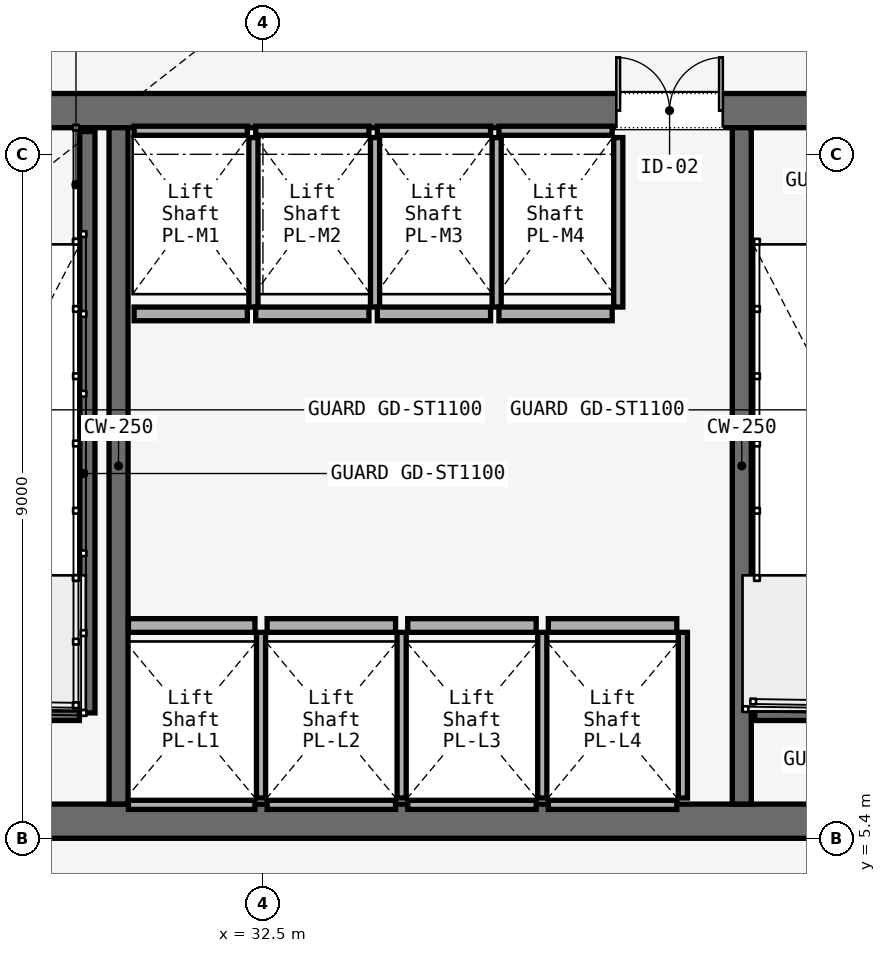
"""IFC4 building model, lengths in metres.
Left out: names, types, materials, properties, quantities, classifications, styles, units other than length and angle.
Written with IfcOpenShell. Run it as: python <this file> out.ifc"""

import sys

from ifc_helpers import new_model, si_unit, direction, frame, frame_2d, origin, place, context, subcontext, project, spatial, rectangle, extrude, element, fill, save


model = new_model("IFC4")
c1 = context("Model", 3, precision=1e-05, world=origin(), true_north=direction((0.0, 1.0)))
c2 = subcontext(c1, "Body", "Model", "MODEL_VIEW")
j1 = project(units=[si_unit("LENGTHUNIT", "METRE"), si_unit("PLANEANGLEUNIT", "RADIAN")], contexts=[c1])
p1 = place(None, origin())
s1 = spatial("IfcSite", under=j1, at=p1, CompositionType="ELEMENT")
p2 = place(p1, origin())
s2 = spatial("IfcBuilding", under=s1, at=p2, CompositionType="ELEMENT")
p3 = place(p2, frame((0.0, 0.0, 30.0)))
s3 = spatial("IfcBuildingStorey", under=s2, at=p3, CompositionType="ELEMENT", Elevation=30.0)
p4 = place(p3, frame((26.45, 14.975, 0.0), z_axis=(0.0, 0.0, 1.0), x_axis=(1.0, 0.0, 0.0)))
e1 = element("IfcWall", 1, at=p4, inside=s3, PredefinedType="SOLIDWALL", context=c2, shape_type="SweptSolid", body=[
    extrude(rectangle(XDim=31.1, YDim=0.45, at=frame_2d((15.55, 0.0))), origin(), (0.0, 0.0, 1.0), 5.78),
])
p5 = place(p4, frame((1.65, 0.0, 0.0)))
e2 = element("IfcOpeningElement", 2, at=p5, cuts=e1, PredefinedType="OPENING", context=c2, shape_type="SweptSolid", body=[
    extrude(rectangle(XDim=1.1, YDim=2.2, at=frame_2d((0.55, 1.1))), frame((0.0, 0.225, 0.0), z_axis=(0.0, -1.0, 0.0), x_axis=(1.0, 0.0, 0.0)), (0.0, 0.0, 1.0), 0.45),
])
p6 = place(p4, frame((13.65, 0.0, 0.0)))
e3 = element("IfcOpeningElement", 3, at=p6, cuts=e1, PredefinedType="OPENING", context=c2, shape_type="SweptSolid", body=[
    extrude(rectangle(XDim=1.1, YDim=2.2, at=frame_2d((0.55, 1.1))), frame((0.0, 0.225, 0.0), z_axis=(0.0, -1.0, 0.0), x_axis=(1.0, 0.0, 0.0)), (0.0, 0.0, 1.0), 0.45),
])
p7 = place(p4, frame((25.55, 0.0, 0.0)))
e4 = element("IfcOpeningElement", 4, at=p7, cuts=e1, PredefinedType="OPENING", context=c2, shape_type="SweptSolid", body=[
    extrude(rectangle(XDim=1.1, YDim=2.2, at=frame_2d((0.55, 1.1))), frame((0.0, 0.225, 0.0), z_axis=(0.0, -1.0, 0.0), x_axis=(1.0, 0.0, 0.0)), (0.0, 0.0, 1.0), 0.45),
])
p8 = place(p4, frame((10.7, 0.0, 0.0)))
e5 = element("IfcOpeningElement", 5, at=p8, cuts=e1, PredefinedType="OPENING", context=c2, shape_type="SweptSolid", body=[
    extrude(rectangle(XDim=1.4, YDim=2.2, at=frame_2d((0.7, 1.1))), frame((0.0, 0.225, 0.0), z_axis=(0.0, -1.0, 0.0), x_axis=(1.0, 0.0, 0.0)), (0.0, 0.0, 1.0), 0.45),
])
p9 = place(p4, frame((19.35, 0.0, 0.0)))
e6 = element("IfcOpeningElement", 6, at=p9, cuts=e1, PredefinedType="OPENING", context=c2, shape_type="SweptSolid", body=[
    extrude(rectangle(XDim=1.1, YDim=2.2, at=frame_2d((0.55, 1.1))), frame((0.0, 0.225, 0.0), z_axis=(0.0, -1.0, 0.0), x_axis=(1.0, 0.0, 0.0)), (0.0, 0.0, 1.0), 0.45),
])
p10 = place(p4, frame((21.4, 0.0, 0.0)))
e7 = element("IfcOpeningElement", 7, at=p10, cuts=e1, PredefinedType="OPENING", context=c2, shape_type="SweptSolid", body=[
    extrude(rectangle(XDim=0.9, YDim=2.1, at=frame_2d((0.45, 1.05))), frame((0.0, 0.225, 0.0), z_axis=(0.0, -1.0, 0.0), x_axis=(1.0, 0.0, 0.0)), (0.0, 0.0, 1.0), 0.45),
])
p11 = place(p4, frame((23.35, 0.0, 0.0)))
e8 = element("IfcOpeningElement", 8, at=p11, cuts=e1, PredefinedType="OPENING", context=c2, shape_type="SweptSolid", body=[
    extrude(rectangle(XDim=1.3, YDim=2.3, at=frame_2d((0.65, 1.15))), frame((0.0, 0.225, 0.0), z_axis=(0.0, -1.0, 0.0), x_axis=(1.0, 0.0, 0.0)), (0.0, 0.0, 1.0), 0.45),
])
p12 = place(p3, frame((26.45, 5.625, 0.0), z_axis=(0.0, 0.0, 1.0), x_axis=(1.0, 0.0, 0.0)))
e9 = element("IfcWall", 9, at=p12, inside=s3, PredefinedType="SOLIDWALL", context=c2, shape_type="SweptSolid", body=[
    extrude(rectangle(XDim=31.1, YDim=0.45, at=frame_2d((15.55, 0.0))), origin(), (0.0, 0.0, 1.0), 5.78),
])
for number, where, z_axis, x_axis in (
    (10, (30.6, 5.85, 0.0), (0.0, 0.0, 1.0), (0.0, 1.0, 0.0)),
    (11, (38.8, 5.85, 0.0), (0.0, 0.0, 1.0), (0.0, 1.0, 0.0)),
):
    element("IfcWall", number, at=place(p3, frame(where, z_axis=z_axis, x_axis=x_axis)), inside=s3, PredefinedType="SOLIDWALL", context=c2, shape_type="SweptSolid", body=[
        extrude(rectangle(XDim=8.9, YDim=0.25, at=frame_2d((4.45, 0.0))), origin(), (0.0, 0.0, 1.0), 5.78),
    ])
p13 = place(p3, frame((30.19, 14.7, 0.0), z_axis=(0.0, 0.0, 1.0), x_axis=(0.0, -1.0, 0.0)))
e12 = element("IfcWall", 12, at=p13, inside=s3, PredefinedType="SOLIDWALL", context=c2, shape_type="SweptSolid", body=[
    extrude(rectangle(XDim=7.65, YDim=0.2, at=frame_2d((3.825, 0.0))), origin(), (0.0, 0.0, 1.0), 6.0),
])
for number, where, z_axis, x_axis in (
    (13, (26.97, 7.05, 0.0), (0.0, 0.0, 1.0), (1.0, 0.0, 0.0)),
    (14, (38.97, 7.05, 0.0), (0.0, 0.0, 1.0), (1.0, 0.0, 0.0)),
):
    element("IfcWall", number, at=place(p3, frame(where, z_axis=z_axis, x_axis=x_axis)), inside=s3, PredefinedType="SOLIDWALL", context=c2, shape_type="SweptSolid", body=[
        extrude(rectangle(XDim=3.115, YDim=0.2, at=frame_2d((1.558, 0.0))), origin(), (0.0, 0.0, 1.0), 6.0),
    ])
p14 = place(p3, frame((30.73, 8.2, 0.0), z_axis=(0.0, 0.0, 1.0), x_axis=(1.0, 0.0, 0.0)))
e15 = element("IfcWall", 15, at=p14, inside=s3, PredefinedType="SOLIDWALL", context=c2, shape_type="SweptSolid", body=[
    extrude(rectangle(XDim=1.665, YDim=0.18, at=frame_2d((0.833, 0.0))), origin(), (0.0, 0.0, 1.0), 5.133),
])
p15 = place(p3, frame((30.73, 5.84, 0.0), z_axis=(0.0, 0.0, 1.0), x_axis=(1.0, 0.0, 0.0)))
e16 = element("IfcWall", 16, at=p15, inside=s3, PredefinedType="SOLIDWALL", context=c2, shape_type="SweptSolid", body=[
    extrude(rectangle(XDim=1.665, YDim=0.12, at=frame_2d((0.833, 0.0))), origin(), (0.0, 0.0, 1.0), 5.133),
])
p16 = place(p3, frame((32.475, 5.93, 0.0), z_axis=(0.0, 0.0, 1.0), x_axis=(0.0, 1.0, 0.0)))
e17 = element("IfcWall", 17, at=p16, inside=s3, PredefinedType="SOLIDWALL", context=c2, shape_type="SweptSolid", body=[
    extrude(rectangle(XDim=2.18, YDim=0.12, at=frame_2d((1.09, 0.0))), origin(), (0.0, 0.0, 1.0), 5.133),
])
p17 = place(p3, frame((32.555, 8.2, 0.0), z_axis=(0.0, 0.0, 1.0), x_axis=(1.0, 0.0, 0.0)))
e18 = element("IfcWall", 18, at=p17, inside=s3, PredefinedType="SOLIDWALL", context=c2, shape_type="SweptSolid", body=[
    extrude(rectangle(XDim=1.69, YDim=0.18, at=frame_2d((0.845, 0.0))), origin(), (0.0, 0.0, 1.0), 5.133),
])
p18 = place(p3, frame((32.555, 5.84, 0.0), z_axis=(0.0, 0.0, 1.0), x_axis=(1.0, 0.0, 0.0)))
e19 = element("IfcWall", 19, at=p18, inside=s3, PredefinedType="SOLIDWALL", context=c2, shape_type="SweptSolid", body=[
    extrude(rectangle(XDim=1.69, YDim=0.12, at=frame_2d((0.845, 0.0))), origin(), (0.0, 0.0, 1.0), 5.133),
])
p19 = place(p3, frame((34.325, 5.93, 0.0), z_axis=(0.0, 0.0, 1.0), x_axis=(0.0, 1.0, 0.0)))
e20 = element("IfcWall", 20, at=p19, inside=s3, PredefinedType="SOLIDWALL", context=c2, shape_type="SweptSolid", body=[
    extrude(rectangle(XDim=2.18, YDim=0.12, at=frame_2d((1.09, 0.0))), origin(), (0.0, 0.0, 1.0), 5.133),
])
p20 = place(p3, frame((34.405, 8.2, 0.0), z_axis=(0.0, 0.0, 1.0), x_axis=(1.0, 0.0, 0.0)))
e21 = element("IfcWall", 21, at=p20, inside=s3, PredefinedType="SOLIDWALL", context=c2, shape_type="SweptSolid", body=[
    extrude(rectangle(XDim=1.69, YDim=0.18, at=frame_2d((0.845, 0.0))), origin(), (0.0, 0.0, 1.0), 5.133),
])
p21 = place(p3, frame((34.405, 5.84, 0.0), z_axis=(0.0, 0.0, 1.0), x_axis=(1.0, 0.0, 0.0)))
e22 = element("IfcWall", 22, at=p21, inside=s3, PredefinedType="SOLIDWALL", context=c2, shape_type="SweptSolid", body=[
    extrude(rectangle(XDim=1.69, YDim=0.12, at=frame_2d((0.845, 0.0))), origin(), (0.0, 0.0, 1.0), 5.133),
])
p22 = place(p3, frame((36.175, 5.93, 0.0), z_axis=(0.0, 0.0, 1.0), x_axis=(0.0, 1.0, 0.0)))
e23 = element("IfcWall", 23, at=p22, inside=s3, PredefinedType="SOLIDWALL", context=c2, shape_type="SweptSolid", body=[
    extrude(rectangle(XDim=2.18, YDim=0.12, at=frame_2d((1.09, 0.0))), origin(), (0.0, 0.0, 1.0), 5.133),
])
p23 = place(p3, frame((36.255, 8.2, 0.0), z_axis=(0.0, 0.0, 1.0), x_axis=(1.0, 0.0, 0.0)))
e24 = element("IfcWall", 24, at=p23, inside=s3, PredefinedType="SOLIDWALL", context=c2, shape_type="SweptSolid", body=[
    extrude(rectangle(XDim=1.69, YDim=0.18, at=frame_2d((0.845, 0.0))), origin(), (0.0, 0.0, 1.0), 5.133),
])
p24 = place(p3, frame((36.255, 5.84, 0.0), z_axis=(0.0, 0.0, 1.0), x_axis=(1.0, 0.0, 0.0)))
e25 = element("IfcWall", 25, at=p24, inside=s3, PredefinedType="SOLIDWALL", context=c2, shape_type="SweptSolid", body=[
    extrude(rectangle(XDim=1.69, YDim=0.12, at=frame_2d((0.845, 0.0))), origin(), (0.0, 0.0, 1.0), 5.133),
])
p25 = place(p3, frame((38.025, 5.93, 0.0), z_axis=(0.0, 0.0, 1.0), x_axis=(0.0, 1.0, 0.0)))
e26 = element("IfcWall", 26, at=p25, inside=s3, PredefinedType="SOLIDWALL", context=c2, shape_type="SweptSolid", body=[
    extrude(rectangle(XDim=2.18, YDim=0.12, at=frame_2d((1.09, 0.0))), origin(), (0.0, 0.0, 1.0), 5.133),
])
p26 = place(p3, frame((30.805, 12.3, 0.0), z_axis=(0.0, 0.0, 1.0), x_axis=(1.0, 0.0, 0.0)))
e27 = element("IfcWall", 27, at=p26, inside=s3, PredefinedType="SOLIDWALL", context=c2, shape_type="SweptSolid", body=[
    extrude(rectangle(XDim=1.49, YDim=0.18, at=frame_2d((0.745, 0.0))), origin(), (0.0, 0.0, 1.0), 5.133),
])
p27 = place(p3, frame((30.805, 14.71, 0.0), z_axis=(0.0, 0.0, 1.0), x_axis=(1.0, 0.0, 0.0)))
e28 = element("IfcWall", 28, at=p27, inside=s3, PredefinedType="SOLIDWALL", context=c2, shape_type="SweptSolid", body=[
    extrude(rectangle(XDim=1.49, YDim=0.12, at=frame_2d((0.745, 0.0))), origin(), (0.0, 0.0, 1.0), 5.133),
])
p28 = place(p3, frame((32.375, 12.39, 0.0), z_axis=(0.0, 0.0, 1.0), x_axis=(0.0, 1.0, 0.0)))
e29 = element("IfcWall", 29, at=p28, inside=s3, PredefinedType="SOLIDWALL", context=c2, shape_type="SweptSolid", body=[
    extrude(rectangle(XDim=2.23, YDim=0.12, at=frame_2d((1.115, 0.0))), origin(), (0.0, 0.0, 1.0), 5.133),
])
p29 = place(p3, frame((32.405, 12.3, 0.0), z_axis=(0.0, 0.0, 1.0), x_axis=(1.0, 0.0, 0.0)))
e30 = element("IfcWall", 30, at=p29, inside=s3, PredefinedType="SOLIDWALL", context=c2, shape_type="SweptSolid", body=[
    extrude(rectangle(XDim=1.49, YDim=0.18, at=frame_2d((0.745, 0.0))), origin(), (0.0, 0.0, 1.0), 5.133),
])
p30 = place(p3, frame((32.405, 14.71, 0.0), z_axis=(0.0, 0.0, 1.0), x_axis=(1.0, 0.0, 0.0)))
e31 = element("IfcWall", 31, at=p30, inside=s3, PredefinedType="SOLIDWALL", context=c2, shape_type="SweptSolid", body=[
    extrude(rectangle(XDim=1.49, YDim=0.12, at=frame_2d((0.745, 0.0))), origin(), (0.0, 0.0, 1.0), 5.133),
])
p31 = place(p3, frame((33.975, 12.39, 0.0), z_axis=(0.0, 0.0, 1.0), x_axis=(0.0, 1.0, 0.0)))
e32 = element("IfcWall", 32, at=p31, inside=s3, PredefinedType="SOLIDWALL", context=c2, shape_type="SweptSolid", body=[
    extrude(rectangle(XDim=2.23, YDim=0.12, at=frame_2d((1.115, 0.0))), origin(), (0.0, 0.0, 1.0), 5.133),
])
p32 = place(p3, frame((34.005, 12.3, 0.0), z_axis=(0.0, 0.0, 1.0), x_axis=(1.0, 0.0, 0.0)))
e33 = element("IfcWall", 33, at=p32, inside=s3, PredefinedType="SOLIDWALL", context=c2, shape_type="SweptSolid", body=[
    extrude(rectangle(XDim=1.49, YDim=0.18, at=frame_2d((0.745, 0.0))), origin(), (0.0, 0.0, 1.0), 5.133),
])
p33 = place(p3, frame((34.005, 14.71, 0.0), z_axis=(0.0, 0.0, 1.0), x_axis=(1.0, 0.0, 0.0)))
e34 = element("IfcWall", 34, at=p33, inside=s3, PredefinedType="SOLIDWALL", context=c2, shape_type="SweptSolid", body=[
    extrude(rectangle(XDim=1.49, YDim=0.12, at=frame_2d((0.745, 0.0))), origin(), (0.0, 0.0, 1.0), 5.133),
])
p34 = place(p3, frame((35.575, 12.39, 0.0), z_axis=(0.0, 0.0, 1.0), x_axis=(0.0, 1.0, 0.0)))
e35 = element("IfcWall", 35, at=p34, inside=s3, PredefinedType="SOLIDWALL", context=c2, shape_type="SweptSolid", body=[
    extrude(rectangle(XDim=2.23, YDim=0.12, at=frame_2d((1.115, 0.0))), origin(), (0.0, 0.0, 1.0), 5.133),
])
p35 = place(p3, frame((35.605, 12.3, 0.0), z_axis=(0.0, 0.0, 1.0), x_axis=(1.0, 0.0, 0.0)))
e36 = element("IfcWall", 36, at=p35, inside=s3, PredefinedType="SOLIDWALL", context=c2, shape_type="SweptSolid", body=[
    extrude(rectangle(XDim=1.49, YDim=0.18, at=frame_2d((0.745, 0.0))), origin(), (0.0, 0.0, 1.0), 5.133),
])
p36 = place(p3, frame((35.605, 14.71, 0.0), z_axis=(0.0, 0.0, 1.0), x_axis=(1.0, 0.0, 0.0)))
e37 = element("IfcWall", 37, at=p36, inside=s3, PredefinedType="SOLIDWALL", context=c2, shape_type="SweptSolid", body=[
    extrude(rectangle(XDim=1.49, YDim=0.12, at=frame_2d((0.745, 0.0))), origin(), (0.0, 0.0, 1.0), 5.133),
])
p37 = place(p3, frame((37.175, 12.39, 0.0), z_axis=(0.0, 0.0, 1.0), x_axis=(0.0, 1.0, 0.0)))
e38 = element("IfcWall", 38, at=p37, inside=s3, PredefinedType="SOLIDWALL", context=c2, shape_type="SweptSolid", body=[
    extrude(rectangle(XDim=2.23, YDim=0.12, at=frame_2d((1.115, 0.0))), origin(), (0.0, 0.0, 1.0), 5.133),
])
p38 = place(p8, origin())
e39 = element("IfcDoor", 39, at=p38, inside=s3, OperationType="DOUBLE_DOOR_SINGLE_SWING", PredefinedType="DOOR", context=c2, shape_type="SweptSolid", body=[
    extrude(rectangle(XDim=1.4, YDim=2.2, at=frame_2d((0.7, 1.1))), frame((0.0, 0.025, 0.0), z_axis=(0.0, -1.0, 0.0), x_axis=(1.0, 0.0, 0.0)), (0.0, 0.0, 1.0), 0.05),
])
fill(e5, e39)
save(model, sys.argv[1])
